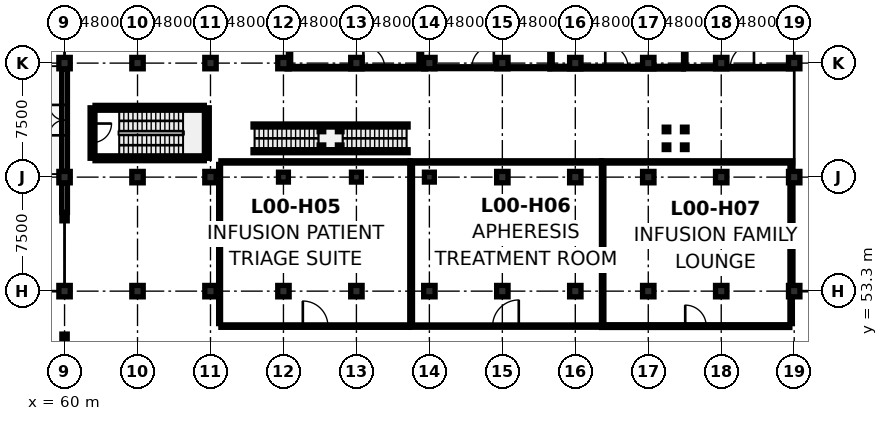
"""IFC4 building model, lengths in metres.
Left out: names, types, materials, properties, quantities, classifications, styles, units other than length and angle.
Written with IfcOpenShell. Run it as: python <this file> out.ifc"""

import sys

from ifc_helpers import new_model, si_unit, direction, frame, frame_2d, origin, origin_2d, place, context, subcontext, project, spatial, rectangle, circle, i_section, extrude, element, fill, save


model = new_model("IFC4")
c1 = context("Model", 3, precision=1e-05, world=origin(), true_north=direction((0.0, 1.0)))
c2 = subcontext(c1, "Body", "Model", "MODEL_VIEW")
j1 = project(units=[si_unit("LENGTHUNIT", "METRE"), si_unit("PLANEANGLEUNIT", "RADIAN")], contexts=[c1])
p1 = place(None, origin())
s1 = spatial("IfcSite", under=j1, at=p1, CompositionType="ELEMENT")
p2 = place(p1, origin())
s2 = spatial("IfcBuilding", under=s1, at=p2, CompositionType="ELEMENT")
p3 = place(p2, origin())
s3 = spatial("IfcBuildingStorey", under=s2, at=p3, CompositionType="ELEMENT", Elevation=0.0)
for number, where, z_axis, x_axis in (
    (1, (60.0, 53.3, 0.0), (0.0, 0.0, 1.0), (1.0, 0.0, 0.0)),
    (2, (60.0, 60.8, 0.0), (0.0, 0.0, 1.0), (1.0, 0.0, 0.0)),
    (3, (60.0, 68.3, 0.0), (0.0, 0.0, 1.0), (1.0, 0.0, 0.0)),
    (4, (64.8, 53.3, 0.0), (0.0, 0.0, 1.0), (1.0, 0.0, 0.0)),
    (5, (64.8, 60.8, 0.0), (0.0, 0.0, 1.0), (1.0, 0.0, 0.0)),
    (6, (64.8, 68.3, 0.0), (0.0, 0.0, 1.0), (1.0, 0.0, 0.0)),
    (7, (69.6, 53.3, 0.0), (0.0, 0.0, 1.0), (1.0, 0.0, 0.0)),
    (8, (69.6, 60.8, 0.0), (0.0, 0.0, 1.0), (1.0, 0.0, 0.0)),
    (9, (69.6, 68.3, 0.0), (0.0, 0.0, 1.0), (1.0, 0.0, 0.0)),
    (10, (74.4, 53.3, 0.0), (0.0, 0.0, 1.0), (1.0, 0.0, 0.0)),
    (11, (74.4, 68.3, 0.0), (0.0, 0.0, 1.0), (1.0, 0.0, 0.0)),
    (12, (79.2, 53.3, 0.0), (0.0, 0.0, 1.0), (1.0, 0.0, 0.0)),
    (13, (79.2, 68.3, 0.0), (0.0, 0.0, 1.0), (1.0, 0.0, 0.0)),
    (14, (84.0, 53.3, 0.0), (0.0, 0.0, 1.0), (1.0, 0.0, 0.0)),
    (15, (84.0, 68.3, 0.0), (0.0, 0.0, 1.0), (1.0, 0.0, 0.0)),
    (16, (88.8, 53.3, 0.0), (0.0, 0.0, 1.0), (1.0, 0.0, 0.0)),
    (17, (88.8, 60.8, 0.0), (0.0, 0.0, 1.0), (1.0, 0.0, 0.0)),
    (18, (88.8, 68.3, 0.0), (0.0, 0.0, 1.0), (1.0, 0.0, 0.0)),
    (19, (93.6, 53.3, 0.0), (0.0, 0.0, 1.0), (1.0, 0.0, 0.0)),
    (20, (93.6, 60.8, 0.0), (0.0, 0.0, 1.0), (1.0, 0.0, 0.0)),
    (21, (93.6, 68.3, 0.0), (0.0, 0.0, 1.0), (1.0, 0.0, 0.0)),
    (22, (98.4, 53.3, 0.0), (0.0, 0.0, 1.0), (1.0, 0.0, 0.0)),
    (23, (98.4, 60.8, 0.0), (0.0, 0.0, 1.0), (1.0, 0.0, 0.0)),
    (24, (98.4, 68.3, 0.0), (0.0, 0.0, 1.0), (1.0, 0.0, 0.0)),
    (25, (103.2, 53.3, 0.0), (0.0, 0.0, 1.0), (1.0, 0.0, 0.0)),
    (26, (103.2, 60.8, 0.0), (0.0, 0.0, 1.0), (1.0, 0.0, 0.0)),
    (27, (103.2, 68.3, 0.0), (0.0, 0.0, 1.0), (1.0, 0.0, 0.0)),
    (28, (108.0, 53.3, 0.0), (0.0, 0.0, 1.0), (1.0, 0.0, 0.0)),
    (29, (108.0, 60.8, 0.0), (0.0, 0.0, 1.0), (1.0, 0.0, 0.0)),
    (30, (108.0, 68.3, 0.0), (0.0, 0.0, 1.0), (1.0, 0.0, 0.0)),
):
    element("IfcColumn", number, at=place(p3, frame(where, z_axis=z_axis, x_axis=x_axis)), inside=s3, PredefinedType="COLUMN", context=c2, shape_type="SweptSolid", body=[
        extrude(circle(Radius=0.375, at=origin_2d()), origin(), (0.0, 0.0, 1.0), 4.7),
    ])
for number, where, z_axis, x_axis in (
    (31, (60.0, 50.2, 0.0), (0.0, 0.0, 1.0), (1.0, 0.0, 0.0)),
    (32, (60.0, 58.2, 0.0), (0.0, 0.0, 1.0), (1.0, 0.0, 0.0)),
):
    element("IfcColumn", number, at=place(p3, frame(where, z_axis=z_axis, x_axis=x_axis)), inside=s3, PredefinedType="PILASTER", context=c2, shape_type="SweptSolid", body=[
        extrude(rectangle(XDim=0.35, YDim=0.55, at=origin_2d()), origin(), (0.0, 0.0, 1.0), 4.7),
    ])
for number, where, z_axis, x_axis in (
    (33, (74.4, 60.8, 0.0), (0.0, 0.0, 1.0), (1.0, 0.0, 0.0)),
    (34, (79.2, 60.8, 0.0), (0.0, 0.0, 1.0), (1.0, 0.0, 0.0)),
    (35, (84.0, 60.8, 0.0), (0.0, 0.0, 1.0), (1.0, 0.0, 0.0)),
):
    element("IfcColumn", number, at=place(p3, frame(where, z_axis=z_axis, x_axis=x_axis)), inside=s3, PredefinedType="COLUMN", context=c2, shape_type="SweptSolid", body=[
        extrude(circle(Radius=0.325, at=origin_2d()), origin(), (0.0, 0.0, 1.0), 4.7),
    ])
p4 = place(p3, frame((60.0, 58.475, 0.0), z_axis=(0.0, 0.0, 1.0), x_axis=(0.0, 1.0, 0.0)))
e36 = element("IfcWall", 36, at=p4, inside=s3, PredefinedType="SOLIDWALL", context=c2, shape_type="SweptSolid", body=[
    extrude(rectangle(XDim=1.95, YDim=0.38, at=frame_2d((0.975, 0.0))), origin(), (0.0, 0.0, 1.0), 4.035),
])
p5 = place(p3, frame((60.0, 61.175, 0.0), z_axis=(0.0, 0.0, 1.0), x_axis=(0.0, 1.0, 0.0)))
e37 = element("IfcWall", 37, at=p5, inside=s3, PredefinedType="SOLIDWALL", context=c2, shape_type="SweptSolid", body=[
    extrude(rectangle(XDim=6.75, YDim=0.38, at=frame_2d((3.375, 0.0))), origin(), (0.0, 0.0, 1.0), 4.035),
])
p6 = place(p5, frame((2.375, 0.0, 0.0)))
e38 = element("IfcOpeningElement", 38, at=p6, cuts=e37, PredefinedType="OPENING", context=c2, shape_type="SweptSolid", body=[
    extrude(rectangle(XDim=2.0, YDim=2.35, at=frame_2d((1.0, 1.175))), frame((0.0, 0.202, 0.0), z_axis=(0.0, -1.0, 0.0), x_axis=(1.0, 0.0, 0.0)), (0.0, 0.0, 1.0), 0.404),
])
p7 = place(p3, frame((62.005, 62.04, 0.0), z_axis=(0.0, 0.0, 1.0), x_axis=(1.0, 0.0, 0.0)))
e39 = element("IfcWall", 39, at=p7, inside=s3, PredefinedType="SHEAR", context=c2, shape_type="SweptSolid", body=[
    extrude(rectangle(XDim=7.19, YDim=0.32, at=frame_2d((3.595, 0.0))), origin(), (0.0, 0.0, 1.0), 4.7),
])
p8 = place(p3, frame((69.36, 62.04, 0.0), z_axis=(0.0, 0.0, 1.0), x_axis=(0.0, 1.0, 0.0)))
e40 = element("IfcWall", 40, at=p8, inside=s3, PredefinedType="SHEAR", context=c2, shape_type="SweptSolid", body=[
    extrude(rectangle(XDim=3.32, YDim=0.32, at=frame_2d((1.66, 0.0))), origin(), (0.0, 0.0, 1.0), 4.7),
])
p9 = place(p3, frame((69.195, 65.36, 0.0), z_axis=(0.0, 0.0, 1.0), x_axis=(-1.0, 0.0, 0.0)))
e41 = element("IfcWall", 41, at=p9, inside=s3, PredefinedType="SHEAR", context=c2, shape_type="SweptSolid", body=[
    extrude(rectangle(XDim=7.19, YDim=0.32, at=frame_2d((3.595, 0.0))), origin(), (0.0, 0.0, 1.0), 4.7),
])
p10 = place(p3, frame((61.84, 65.36, 0.0), z_axis=(0.0, 0.0, 1.0), x_axis=(0.0, -1.0, 0.0)))
e42 = element("IfcWall", 42, at=p10, inside=s3, PredefinedType="SHEAR", context=c2, shape_type="SweptSolid", body=[
    extrude(rectangle(XDim=3.32, YDim=0.32, at=frame_2d((1.66, 0.0))), origin(), (0.0, 0.0, 1.0), 4.7),
])
p11 = place(p10, frame((1.035, 0.0, 0.0)))
e43 = element("IfcOpeningElement", 43, at=p11, cuts=e42, PredefinedType="OPENING", context=c2, shape_type="SweptSolid", body=[
    extrude(rectangle(XDim=1.25, YDim=2.2, at=frame_2d((0.625, 1.1))), frame((0.0, 0.172, 0.0), z_axis=(0.0, -1.0, 0.0), x_axis=(1.0, 0.0, 0.0)), (0.0, 0.0, 1.0), 0.344),
])
for number, where, z_axis, x_axis in (
    (44, (72.4, 62.505, 0.0), (0.0, 0.0, 1.0), (1.0, 0.0, 0.0)),
    (45, (72.4, 64.195, 0.0), (0.0, 0.0, 1.0), (1.0, 0.0, 0.0)),
):
    element("IfcWall", number, at=place(p3, frame(where, z_axis=z_axis, x_axis=x_axis)), inside=s3, PredefinedType="PARTITIONING", context=c2, shape_type="SweptSolid", body=[
        extrude(rectangle(XDim=10.2, YDim=0.2, at=frame_2d((5.1, 0.0))), origin(), (0.0, 0.0, 1.0), 2.3),
    ])
for number, where, z_axis, x_axis in (
    (46, (76.9, 62.765, 0.0), (0.0, 0.0, 1.0), (1.0, 0.0, 0.0)),
    (47, (78.1, 62.765, 0.0), (0.0, 0.0, 1.0), (1.0, 0.0, 0.0)),
    (48, (78.1, 63.935, 0.0), (0.0, 0.0, 1.0), (1.0, 0.0, 0.0)),
    (49, (76.9, 63.935, 0.0), (0.0, 0.0, 1.0), (1.0, 0.0, 0.0)),
):
    element("IfcColumn", number, at=place(p3, frame(where, z_axis=z_axis, x_axis=x_axis)), inside=s3, PredefinedType="COLUMN", context=c2, shape_type="SweptSolid", body=[
        extrude(i_section(OverallWidth=0.3, OverallDepth=0.3, WebThickness=0.011, FlangeThickness=0.019, FilletRadius=0.027, at=origin_2d()), origin(), (0.0, 0.0, 1.0), 2.3),
    ])
for number, where, z_axis, x_axis in (
    (50, (99.6, 62.765, 0.0), (0.0, 0.0, 1.0), (1.0, 0.0, 0.0)),
    (51, (100.8, 62.765, 0.0), (0.0, 0.0, 1.0), (1.0, 0.0, 0.0)),
    (52, (100.8, 63.935, 0.0), (0.0, 0.0, 1.0), (1.0, 0.0, 0.0)),
    (53, (99.6, 63.935, 0.0), (0.0, 0.0, 1.0), (1.0, 0.0, 0.0)),
):
    element("IfcColumn", number, at=place(p3, frame(where, z_axis=z_axis, x_axis=x_axis)), inside=s3, PredefinedType="COLUMN", context=c2, shape_type="SweptSolid", body=[
        extrude(i_section(OverallWidth=0.3, OverallDepth=0.3, WebThickness=0.011, FlangeThickness=0.019, FilletRadius=0.027, at=origin_2d()), origin(), (0.0, 0.0, 1.0), 4.7),
    ])
p12 = place(p3, frame((74.636, 68.0, 0.0), z_axis=(0.0, 0.0, 1.0), x_axis=(1.0, 0.0, 0.0)))
e54 = element("IfcWall", 54, at=p12, inside=s3, PredefinedType="PARTITIONING", context=c2, shape_type="SweptSolid", body=[
    extrude(rectangle(XDim=9.127, YDim=0.16, at=frame_2d((4.563, 0.0))), origin(), (0.0, 0.0, 1.0), 4.085),
])
p13 = place(p12, frame((5.022, 0.0, 0.0)))
e55 = element("IfcOpeningElement", 55, at=p13, cuts=e54, PredefinedType="OPENING", context=c2, shape_type="SweptSolid", body=[
    extrude(rectangle(XDim=1.4, YDim=2.25, at=frame_2d((0.7, 1.125))), frame((0.0, 0.092, 0.0), z_axis=(0.0, -1.0, 0.0), x_axis=(1.0, 0.0, 0.0)), (0.0, 0.0, 1.0), 0.184),
])
p14 = place(p3, frame((84.237, 68.0, 0.0), z_axis=(0.0, 0.0, 1.0), x_axis=(1.0, 0.0, 0.0)))
e56 = element("IfcWall", 56, at=p14, inside=s3, PredefinedType="PARTITIONING", context=c2, shape_type="SweptSolid", body=[
    extrude(rectangle(XDim=7.678, YDim=0.125, at=frame_2d((3.839, 0.0))), origin(), (0.0, 0.0, 1.0), 3.985),
])
p15 = place(p14, frame((2.554, 0.0, 0.0)))
e57 = element("IfcOpeningElement", 57, at=p15, cuts=e56, PredefinedType="OPENING", context=c2, shape_type="SweptSolid", body=[
    extrude(rectangle(XDim=1.45, YDim=2.26, at=frame_2d((0.725, 1.13))), frame((0.0, 0.074, 0.0), z_axis=(0.0, -1.0, 0.0), x_axis=(1.0, 0.0, 0.0)), (0.0, 0.0, 1.0), 0.149),
])
p16 = place(p3, frame((91.927, 68.0, 0.0), z_axis=(0.0, 0.0, 1.0), x_axis=(1.0, 0.0, 0.0)))
e58 = element("IfcWall", 58, at=p16, inside=s3, PredefinedType="PARTITIONING", context=c2, shape_type="SweptSolid", body=[
    extrude(rectangle(XDim=8.788, YDim=0.18, at=frame_2d((4.394, 0.0))), origin(), (0.0, 0.0, 1.0), 3.985),
])
p17 = place(p16, frame((3.644, 0.0, 0.0)))
e59 = element("IfcOpeningElement", 59, at=p17, cuts=e58, PredefinedType="OPENING", context=c2, shape_type="SweptSolid", body=[
    extrude(rectangle(XDim=1.5, YDim=2.28, at=frame_2d((0.75, 1.14))), frame((0.0, 0.102, 0.0), z_axis=(0.0, -1.0, 0.0), x_axis=(1.0, 0.0, 0.0)), (0.0, 0.0, 1.0), 0.204),
])
p18 = place(p3, frame((100.727, 68.0, 0.0), z_axis=(0.0, 0.0, 1.0), x_axis=(1.0, 0.0, 0.0)))
e60 = element("IfcWall", 60, at=p18, inside=s3, PredefinedType="PARTITIONING", context=c2, shape_type="SweptSolid", body=[
    extrude(rectangle(XDim=7.036, YDim=0.15, at=frame_2d((3.518, 0.0))), origin(), (0.0, 0.0, 1.0), 4.035),
])
p19 = place(p18, frame((3.067, 0.0, 0.0)))
e61 = element("IfcOpeningElement", 61, at=p19, cuts=e60, PredefinedType="OPENING", context=c2, shape_type="SweptSolid", body=[
    extrude(rectangle(XDim=1.56, YDim=2.3, at=frame_2d((0.78, 1.15))), frame((0.0, 0.087, 0.0), z_axis=(0.0, -1.0, 0.0), x_axis=(1.0, 0.0, 0.0)), (0.0, 0.0, 1.0), 0.174),
])
p20 = place(p3, frame((70.285, 51.0, 0.0), z_axis=(0.0, 0.0, 1.0), x_axis=(1.0, 0.0, 0.0)))
e62 = element("IfcWall", 62, at=p20, inside=s3, PredefinedType="PARTITIONING", context=c2, shape_type="SweptSolid", body=[
    extrude(rectangle(XDim=12.43, YDim=0.16, at=frame_2d((6.215, 0.0))), origin(), (0.0, 0.0, 1.0), 3.985),
])
p21 = place(p20, frame((5.39, 0.0, 0.0)))
e63 = element("IfcOpeningElement", 63, at=p21, cuts=e62, PredefinedType="OPENING", context=c2, shape_type="SweptSolid", body=[
    extrude(rectangle(XDim=1.65, YDim=2.32, at=frame_2d((0.825, 1.16))), frame((0.0, 0.092, 0.0), z_axis=(0.0, -1.0, 0.0), x_axis=(1.0, 0.0, 0.0)), (0.0, 0.0, 1.0), 0.184),
])
p22 = place(p3, frame((82.727, 51.0, 0.0), z_axis=(0.0, 0.0, 1.0), x_axis=(1.0, 0.0, 0.0)))
e64 = element("IfcWall", 64, at=p22, inside=s3, PredefinedType="PARTITIONING", context=c2, shape_type="SweptSolid", body=[
    extrude(rectangle(XDim=12.588, YDim=0.15, at=frame_2d((6.294, 0.0))), origin(), (0.0, 0.0, 1.0), 3.985),
])
p23 = place(p22, frame((5.434, 0.0, 0.0)))
e65 = element("IfcOpeningElement", 65, at=p23, cuts=e64, PredefinedType="OPENING", context=c2, shape_type="SweptSolid", body=[
    extrude(rectangle(XDim=1.72, YDim=2.34, at=frame_2d((0.86, 1.17))), frame((0.0, 0.087, 0.0), z_axis=(0.0, -1.0, 0.0), x_axis=(1.0, 0.0, 0.0)), (0.0, 0.0, 1.0), 0.174),
])
p24 = place(p3, frame((95.327, 51.0, 0.0), z_axis=(0.0, 0.0, 1.0), x_axis=(1.0, 0.0, 0.0)))
e66 = element("IfcWall", 66, at=p24, inside=s3, PredefinedType="PARTITIONING", context=c2, shape_type="SweptSolid", body=[
    extrude(rectangle(XDim=12.388, YDim=0.18, at=frame_2d((6.194, 0.0))), origin(), (0.0, 0.0, 1.0), 3.985),
])
p25 = place(p24, frame((5.504, 0.0, 0.0)))
e67 = element("IfcOpeningElement", 67, at=p25, cuts=e66, PredefinedType="OPENING", context=c2, shape_type="SweptSolid", body=[
    extrude(rectangle(XDim=1.38, YDim=2.3, at=frame_2d((0.69, 1.15))), frame((0.0, 0.102, 0.0), z_axis=(0.0, -1.0, 0.0), x_axis=(1.0, 0.0, 0.0)), (0.0, 0.0, 1.0), 0.204),
])
p26 = place(p3, frame((70.285, 61.8, 0.0), z_axis=(0.0, 0.0, 1.0), x_axis=(1.0, 0.0, 0.0)))
e68 = element("IfcWall", 68, at=p26, inside=s3, PredefinedType="PARTITIONING", context=c2, shape_type="SweptSolid", body=[
    extrude(rectangle(XDim=12.43, YDim=0.15, at=frame_2d((6.215, 0.0))), origin(), (0.0, 0.0, 1.0), 4.7),
])
p27 = place(p3, frame((82.727, 61.8, 0.0), z_axis=(0.0, 0.0, 1.0), x_axis=(1.0, 0.0, 0.0)))
e69 = element("IfcWall", 69, at=p27, inside=s3, PredefinedType="PARTITIONING", context=c2, shape_type="SweptSolid", body=[
    extrude(rectangle(XDim=12.588, YDim=0.15, at=frame_2d((6.294, 0.0))), origin(), (0.0, 0.0, 1.0), 3.985),
])
p28 = place(p3, frame((95.327, 61.8, 0.0), z_axis=(0.0, 0.0, 1.0), x_axis=(1.0, 0.0, 0.0)))
e70 = element("IfcWall", 70, at=p28, inside=s3, PredefinedType="PARTITIONING", context=c2, shape_type="SweptSolid", body=[
    extrude(rectangle(XDim=12.571, YDim=0.15, at=frame_2d((6.286, 0.0))), origin(), (0.0, 0.0, 1.0), 4.035),
])
p29 = place(p3, frame((74.8, 68.092, 0.0), z_axis=(0.0, 0.0, 1.0), x_axis=(0.0, 1.0, 0.0)))
e71 = element("IfcWall", 71, at=p29, inside=s3, PredefinedType="PARTITIONING", context=c2, shape_type="SweptSolid", body=[
    extrude(rectangle(XDim=7.421, YDim=0.15, at=frame_2d((3.71, 0.0))), origin(), (0.0, 0.0, 1.0), 3.985),
])
p30 = place(p3, frame((83.4, 68.092, 0.0), z_axis=(0.0, 0.0, 1.0), x_axis=(0.0, 1.0, 0.0)))
e72 = element("IfcWall", 72, at=p30, inside=s3, PredefinedType="PARTITIONING", context=c2, shape_type="SweptSolid", body=[
    extrude(rectangle(XDim=7.421, YDim=0.18, at=frame_2d((3.71, 0.0))), origin(), (0.0, 0.0, 1.0), 4.035),
])
p31 = place(p3, frame((92.0, 68.102, 0.0), z_axis=(0.0, 0.0, 1.0), x_axis=(0.0, 1.0, 0.0)))
e73 = element("IfcWall", 73, at=p31, inside=s3, PredefinedType="PARTITIONING", context=c2, shape_type="SweptSolid", body=[
    extrude(rectangle(XDim=7.411, YDim=0.16, at=frame_2d((3.706, 0.0))), origin(), (0.0, 0.0, 1.0), 4.085),
])
p32 = place(p3, frame((100.8, 68.087, 0.0), z_axis=(0.0, 0.0, 1.0), x_axis=(0.0, 1.0, 0.0)))
e74 = element("IfcWall", 74, at=p32, inside=s3, PredefinedType="PARTITIONING", context=c2, shape_type="SweptSolid", body=[
    extrude(rectangle(XDim=7.411, YDim=0.16, at=frame_2d((3.706, 0.0))), origin(), (0.0, 0.0, 1.0), 4.035),
])
p33 = place(p3, frame((70.2, 51.165, 0.0), z_axis=(0.0, 0.0, 1.0), x_axis=(0.0, 1.0, 0.0)))
e75 = element("IfcWall", 75, at=p33, inside=s3, PredefinedType="PARTITIONING", context=c2, shape_type="SweptSolid", body=[
    extrude(rectangle(XDim=10.47, YDim=0.125, at=frame_2d((5.235, 0.0))), origin(), (0.0, 0.0, 1.0), 4.085),
])
p34 = place(p3, frame((82.8, 51.087, 0.0), z_axis=(0.0, 0.0, 1.0), x_axis=(0.0, 1.0, 0.0)))
e76 = element("IfcWall", 76, at=p34, inside=s3, PredefinedType="PARTITIONING", context=c2, shape_type="SweptSolid", body=[
    extrude(rectangle(XDim=10.626, YDim=0.18, at=frame_2d((5.313, 0.0))), origin(), (0.0, 0.0, 1.0), 4.035),
])
p35 = place(p3, frame((95.4, 51.102, 0.0), z_axis=(0.0, 0.0, 1.0), x_axis=(0.0, 1.0, 0.0)))
e77 = element("IfcWall", 77, at=p35, inside=s3, PredefinedType="PARTITIONING", context=c2, shape_type="SweptSolid", body=[
    extrude(rectangle(XDim=10.611, YDim=0.16, at=frame_2d((5.305, 0.0))), origin(), (0.0, 0.0, 1.0), 4.085),
])
p36 = place(p3, frame((107.8, 51.165, 0.0), z_axis=(0.0, 0.0, 1.0), x_axis=(0.0, 1.0, 0.0)))
e78 = element("IfcWall", 78, at=p36, inside=s3, PredefinedType="PARTITIONING", context=c2, shape_type="SweptSolid", body=[
    extrude(rectangle(XDim=10.548, YDim=0.16, at=frame_2d((5.274, 0.0))), origin(), (0.0, 0.0, 1.0), 3.985),
])
p37 = place(p6, origin())
e79 = element("IfcDoor", 79, at=p37, inside=s3, OperationType="DOUBLE_DOOR_SINGLE_SWING", PredefinedType="DOOR", context=c2, shape_type="SweptSolid", body=[
    extrude(rectangle(XDim=2.0, YDim=2.35, at=frame_2d((1.0, 1.175))), frame((0.0, 0.025, 0.0), z_axis=(0.0, -1.0, 0.0), x_axis=(1.0, 0.0, 0.0)), (0.0, 0.0, 1.0), 0.05),
])
fill(e38, e79)
p38 = place(p11, origin())
e80 = element("IfcDoor", 80, at=p38, inside=s3, OperationType="SINGLE_SWING_LEFT", PredefinedType="DOOR", context=c2, shape_type="SweptSolid", body=[
    extrude(rectangle(XDim=1.25, YDim=2.2, at=frame_2d((0.625, 1.1))), frame((0.0, 0.025, 0.0), z_axis=(0.0, -1.0, 0.0), x_axis=(1.0, 0.0, 0.0)), (0.0, 0.0, 1.0), 0.05),
])
fill(e43, e80)
p39 = place(p13, origin())
e81 = element("IfcDoor", 81, at=p39, inside=s3, OperationType="SINGLE_SWING_LEFT", PredefinedType="DOOR", context=c2, shape_type="SweptSolid", body=[
    extrude(rectangle(XDim=1.4, YDim=2.25, at=frame_2d((0.7, 1.125))), frame((0.0, 0.025, 0.0), z_axis=(0.0, -1.0, 0.0), x_axis=(1.0, 0.0, 0.0)), (0.0, 0.0, 1.0), 0.05),
])
fill(e55, e81)
p40 = place(p15, origin())
e82 = element("IfcDoor", 82, at=p40, inside=s3, OperationType="SINGLE_SWING_RIGHT", PredefinedType="DOOR", context=c2, shape_type="SweptSolid", body=[
    extrude(rectangle(XDim=1.45, YDim=2.26, at=frame_2d((0.725, 1.13))), frame((0.0, 0.025, 0.0), z_axis=(0.0, -1.0, 0.0), x_axis=(1.0, 0.0, 0.0)), (0.0, 0.0, 1.0), 0.05),
])
fill(e57, e82)
p41 = place(p17, origin())
e83 = element("IfcDoor", 83, at=p41, inside=s3, OperationType="SINGLE_SWING_LEFT", PredefinedType="DOOR", context=c2, shape_type="SweptSolid", body=[
    extrude(rectangle(XDim=1.5, YDim=2.28, at=frame_2d((0.75, 1.14))), frame((0.0, 0.025, 0.0), z_axis=(0.0, -1.0, 0.0), x_axis=(1.0, 0.0, 0.0)), (0.0, 0.0, 1.0), 0.05),
])
fill(e59, e83)
p42 = place(p19, origin())
e84 = element("IfcDoor", 84, at=p42, inside=s3, OperationType="SINGLE_SWING_RIGHT", PredefinedType="DOOR", context=c2, shape_type="SweptSolid", body=[
    extrude(rectangle(XDim=1.56, YDim=2.3, at=frame_2d((0.78, 1.15))), frame((0.0, 0.025, 0.0), z_axis=(0.0, -1.0, 0.0), x_axis=(1.0, 0.0, 0.0)), (0.0, 0.0, 1.0), 0.05),
])
fill(e61, e84)
p43 = place(p21, origin())
e85 = element("IfcDoor", 85, at=p43, inside=s3, OperationType="SINGLE_SWING_LEFT", PredefinedType="DOOR", context=c2, shape_type="SweptSolid", body=[
    extrude(rectangle(XDim=1.65, YDim=2.32, at=frame_2d((0.825, 1.16))), frame((0.0, 0.025, 0.0), z_axis=(0.0, -1.0, 0.0), x_axis=(1.0, 0.0, 0.0)), (0.0, 0.0, 1.0), 0.05),
])
fill(e63, e85)
p44 = place(p23, origin())
e86 = element("IfcDoor", 86, at=p44, inside=s3, OperationType="SINGLE_SWING_RIGHT", PredefinedType="DOOR", context=c2, shape_type="SweptSolid", body=[
    extrude(rectangle(XDim=1.72, YDim=2.34, at=frame_2d((0.86, 1.17))), frame((0.0, 0.025, 0.0), z_axis=(0.0, -1.0, 0.0), x_axis=(1.0, 0.0, 0.0)), (0.0, 0.0, 1.0), 0.05),
])
fill(e65, e86)
p45 = place(p25, origin())
e87 = element("IfcDoor", 87, at=p45, inside=s3, OperationType="SINGLE_SWING_LEFT", PredefinedType="DOOR", context=c2, shape_type="SweptSolid", body=[
    extrude(rectangle(XDim=1.38, YDim=2.3, at=frame_2d((0.69, 1.15))), frame((0.0, 0.025, 0.0), z_axis=(0.0, -1.0, 0.0), x_axis=(1.0, 0.0, 0.0)), (0.0, 0.0, 1.0), 0.05),
])
fill(e67, e87)
save(model, sys.argv[1])
